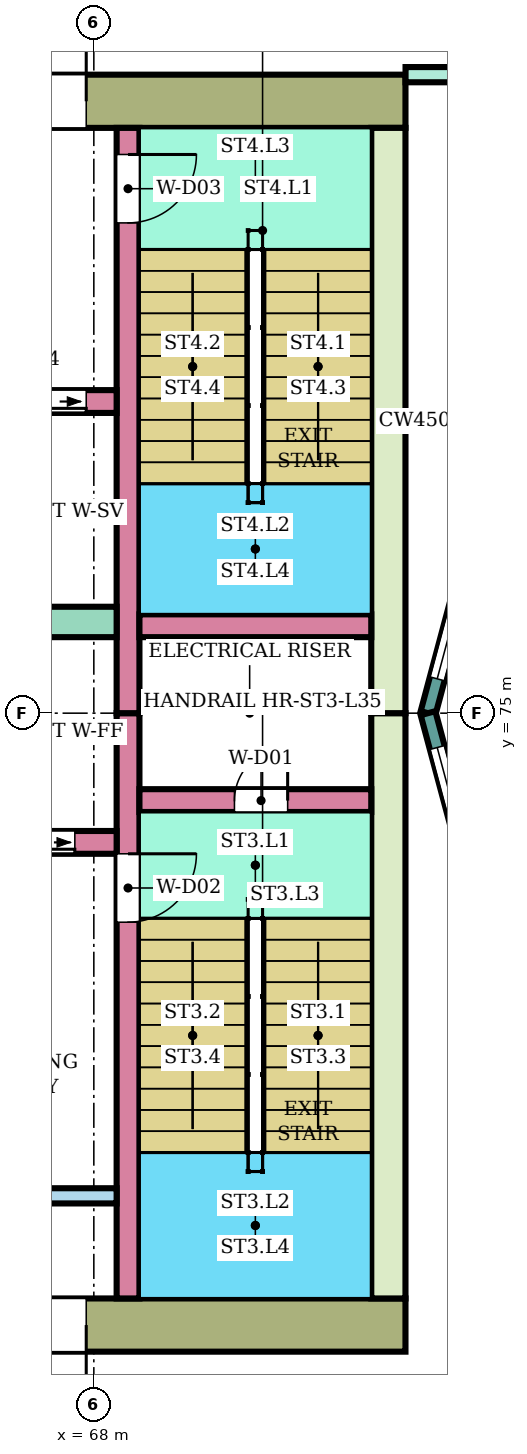
"""IFC4 building model, lengths in metres.
Left out: names, types, materials, properties, quantities, classifications, styles, units other than length and angle.
Written with IfcOpenShell. Run it as: python <this file> out.ifc"""

import sys

from ifc_helpers import new_model, si_unit, direction, frame, frame_2d, origin, place, context, subcontext, project, spatial, rectangle, extrude, element, fill, save


model = new_model("IFC4")
c1 = context("Model", 3, precision=1e-05, world=origin(), true_north=direction((0.0, 1.0)))
c2 = subcontext(c1, "Body", "Model", "MODEL_VIEW")
j1 = project(units=[si_unit("LENGTHUNIT", "METRE"), si_unit("PLANEANGLEUNIT", "RADIAN")], contexts=[c1])
p1 = place(None, origin())
s1 = spatial("IfcSite", under=j1, at=p1, CompositionType="ELEMENT")
p2 = place(p1, origin())
s2 = spatial("IfcBuilding", under=s1, at=p2, CompositionType="ELEMENT")
p3 = place(p2, frame((0.0, 0.0, 149.7)))
s3 = spatial("IfcBuildingStorey", under=s2, at=p3, CompositionType="ELEMENT", Elevation=149.7)
p4 = place(p3, frame((72.1, 66.95, 0.0), z_axis=(0.0, 0.0, 1.0), x_axis=(-1.0, 0.0, 0.0)))
e1 = element("IfcWall", 1, at=p4, inside=s3, PredefinedType="SHEAR", context=c2, shape_type="SweptSolid", body=[
    extrude(rectangle(XDim=14.8, YDim=0.7, at=frame_2d((7.4, 0.0))), origin(), (0.0, 0.0, 1.0), 7.68),
])
p5 = place(p4, frame((4.2, 0.0, 0.0)))
e2 = element("IfcOpeningElement", 2, at=p5, cuts=e1, PredefinedType="OPENING", context=c2, shape_type="SweptSolid", body=[
    extrude(rectangle(XDim=2.4, YDim=2.4, at=frame_2d((1.2, 1.2))), frame((0.0, 0.36, 0.0), z_axis=(0.0, -1.0, 0.0), x_axis=(1.0, 0.0, 0.0)), (0.0, 0.0, 1.0), 0.72),
])
p6 = place(p3, frame((72.1, 83.05, 0.0), z_axis=(0.0, 0.0, 1.0), x_axis=(-1.0, 0.0, 0.0)))
e3 = element("IfcWall", 3, at=p6, inside=s3, PredefinedType="SHEAR", context=c2, shape_type="SweptSolid", body=[
    extrude(rectangle(XDim=14.8, YDim=0.7, at=frame_2d((7.4, 0.0))), origin(), (0.0, 0.0, 1.0), 7.68),
])
p7 = place(p6, frame((4.2, 0.0, 0.0)))
e4 = element("IfcOpeningElement", 4, at=p7, cuts=e3, PredefinedType="OPENING", context=c2, shape_type="SweptSolid", body=[
    extrude(rectangle(XDim=2.4, YDim=2.4, at=frame_2d((1.2, 1.2))), frame((0.0, 0.36, 0.0), z_axis=(0.0, -1.0, 0.0), x_axis=(1.0, 0.0, 0.0)), (0.0, 0.0, 1.0), 0.72),
])
for number, where, z_axis, x_axis in (
    (5, (71.875, 75.0, 0.0), (0.0, 0.0, 1.0), (0.0, -1.0, 0.0)),
    (6, (71.875, 82.7, 0.0), (0.0, 0.0, 1.0), (0.0, -1.0, 0.0)),
):
    element("IfcWall", number, at=place(p3, frame(where, z_axis=z_axis, x_axis=x_axis)), inside=s3, PredefinedType="SHEAR", context=c2, shape_type="SweptSolid", body=[
        extrude(rectangle(XDim=7.7, YDim=0.45, at=frame_2d((3.85, 0.0))), origin(), (0.0, 0.0, 1.0), 7.68),
    ])
p8 = place(p3, frame((68.45, 75.0, 0.0), z_axis=(0.0, 0.0, 1.0), x_axis=(0.0, -1.0, 0.0)))
e7 = element("IfcWall", 7, at=p8, inside=s3, PredefinedType="SHEAR", context=c2, shape_type="SweptSolid", body=[
    extrude(rectangle(XDim=7.7, YDim=0.3, at=frame_2d((3.85, 0.0))), origin(), (0.0, 0.0, 1.0), 7.68),
])
p9 = place(p8, frame((1.85, 0.0, 0.0)))
e8 = element("IfcOpeningElement", 8, at=p9, cuts=e7, PredefinedType="OPENING", context=c2, shape_type="SweptSolid", body=[
    extrude(rectangle(XDim=0.9, YDim=2.1, at=frame_2d((0.45, 1.05))), frame((0.0, 0.16, 0.0), z_axis=(0.0, -1.0, 0.0), x_axis=(1.0, 0.0, 0.0)), (0.0, 0.0, 1.0), 0.32),
])
p10 = place(p3, frame((68.45, 82.7, 0.0), z_axis=(0.0, 0.0, 1.0), x_axis=(0.0, -1.0, 0.0)))
e9 = element("IfcWall", 9, at=p10, inside=s3, PredefinedType="SHEAR", context=c2, shape_type="SweptSolid", body=[
    extrude(rectangle(XDim=7.7, YDim=0.3, at=frame_2d((3.85, 0.0))), origin(), (0.0, 0.0, 1.0), 7.68),
])
p11 = place(p10, frame((0.35, 0.0, 0.0)))
e10 = element("IfcOpeningElement", 10, at=p11, cuts=e9, PredefinedType="OPENING", context=c2, shape_type="SweptSolid", body=[
    extrude(rectangle(XDim=0.9, YDim=2.1, at=frame_2d((0.45, 1.05))), frame((0.0, 0.16, 0.0), z_axis=(0.0, -1.0, 0.0), x_axis=(1.0, 0.0, 0.0)), (0.0, 0.0, 1.0), 0.32),
])
p12 = place(p3, frame((71.65, 73.85, 0.0), z_axis=(0.0, 0.0, 1.0), x_axis=(-1.0, 0.0, 0.0)))
e11 = element("IfcWall", 11, at=p12, inside=s3, PredefinedType="SHEAR", context=c2, shape_type="SweptSolid", body=[
    extrude(rectangle(XDim=3.05, YDim=0.3, at=frame_2d((1.525, 0.0))), origin(), (0.0, 0.0, 1.0), 7.68),
])
p13 = place(p12, frame((1.1, 0.0, 0.0)))
e12 = element("IfcOpeningElement", 12, at=p13, cuts=e11, PredefinedType="OPENING", context=c2, shape_type="SweptSolid", body=[
    extrude(rectangle(XDim=0.7, YDim=2.0, at=frame_2d((0.35, 1.0))), frame((0.0, 0.16, 0.0), z_axis=(0.0, -1.0, 0.0), x_axis=(1.0, 0.0, 0.0)), (0.0, 0.0, 1.0), 0.32),
])
p14 = place(p3, frame((71.65, 76.15, 0.0), z_axis=(0.0, 0.0, 1.0), x_axis=(-1.0, 0.0, 0.0)))
e13 = element("IfcWall", 13, at=p14, inside=s3, PredefinedType="SHEAR", context=c2, shape_type="SweptSolid", body=[
    extrude(rectangle(XDim=3.05, YDim=0.3, at=frame_2d((1.525, 0.0))), origin(), (0.0, 0.0, 1.0), 7.68),
])
p15 = place(p3, frame((68.3, 73.3, 0.0), z_axis=(0.0, 0.0, 1.0), x_axis=(-1.0, 0.0, 0.0)))
e14 = element("IfcWall", 14, at=p15, inside=s3, PredefinedType="SHEAR", context=c2, shape_type="SweptSolid", body=[
    extrude(rectangle(XDim=11.0, YDim=0.3, at=frame_2d((5.5, 0.0))), origin(), (0.0, 0.0, 1.0), 7.68),
])
p16 = place(p15, frame((0.55, 0.0, 0.0)))
e15 = element("IfcOpeningElement", 15, at=p16, cuts=e14, PredefinedType="OPENING", context=c2, shape_type="SweptSolid", body=[
    extrude(rectangle(XDim=1.1, YDim=2.1, at=frame_2d((0.55, 1.05))), frame((0.0, 0.16, 0.0), z_axis=(0.0, -1.0, 0.0), x_axis=(1.0, 0.0, 0.0)), (0.0, 0.0, 1.0), 0.32),
])
p17 = place(p15, frame((3.0, 0.0, 0.0)))
e16 = element("IfcOpeningElement", 16, at=p17, cuts=e14, PredefinedType="OPENING", context=c2, shape_type="SweptSolid", body=[
    extrude(rectangle(XDim=1.2, YDim=2.1, at=frame_2d((0.6, 1.05))), frame((0.0, 0.16, 0.0), z_axis=(0.0, -1.0, 0.0), x_axis=(1.0, 0.0, 0.0)), (0.0, 0.0, 1.0), 0.32),
])
p18 = place(p15, frame((5.5, 0.0, 0.0)))
e17 = element("IfcOpeningElement", 17, at=p18, cuts=e14, PredefinedType="OPENING", context=c2, shape_type="SweptSolid", body=[
    extrude(rectangle(XDim=1.2, YDim=2.1, at=frame_2d((0.6, 1.05))), frame((0.0, 0.16, 0.0), z_axis=(0.0, -1.0, 0.0), x_axis=(1.0, 0.0, 0.0)), (0.0, 0.0, 1.0), 0.32),
])
p19 = place(p15, frame((8.1, 0.0, 0.0)))
e18 = element("IfcOpeningElement", 18, at=p19, cuts=e14, PredefinedType="OPENING", context=c2, shape_type="SweptSolid", body=[
    extrude(rectangle(XDim=1.0, YDim=2.1, at=frame_2d((0.5, 1.05))), frame((0.0, 0.16, 0.0), z_axis=(0.0, -1.0, 0.0), x_axis=(1.0, 0.0, 0.0)), (0.0, 0.0, 1.0), 0.32),
])
p20 = place(p3, frame((68.3, 76.2, 0.0), z_axis=(0.0, 0.0, 1.0), x_axis=(-1.0, 0.0, 0.0)))
e19 = element("IfcWall", 19, at=p20, inside=s3, PredefinedType="SHEAR", context=c2, shape_type="SweptSolid", body=[
    extrude(rectangle(XDim=11.0, YDim=0.4, at=frame_2d((5.5, 0.0))), origin(), (0.0, 0.0, 1.0), 7.68),
])
p21 = place(p3, frame((68.3, 79.1, 0.0), z_axis=(0.0, 0.0, 1.0), x_axis=(-1.0, 0.0, 0.0)))
e20 = element("IfcWall", 20, at=p21, inside=s3, PredefinedType="SHEAR", context=c2, shape_type="SweptSolid", body=[
    extrude(rectangle(XDim=11.0, YDim=0.3, at=frame_2d((5.5, 0.0))), origin(), (0.0, 0.0, 1.0), 7.68),
])
p22 = place(p21, frame((0.4, 0.0, 0.0)))
e21 = element("IfcOpeningElement", 21, at=p22, cuts=e20, PredefinedType="OPENING", context=c2, shape_type="SweptSolid", body=[
    extrude(rectangle(XDim=1.4, YDim=2.1, at=frame_2d((0.7, 1.05))), frame((0.0, 0.16, 0.0), z_axis=(0.0, -1.0, 0.0), x_axis=(1.0, 0.0, 0.0)), (0.0, 0.0, 1.0), 0.32),
])
p23 = place(p21, frame((3.0, 0.0, 0.0)))
e22 = element("IfcOpeningElement", 22, at=p23, cuts=e20, PredefinedType="OPENING", context=c2, shape_type="SweptSolid", body=[
    extrude(rectangle(XDim=1.2, YDim=2.1, at=frame_2d((0.6, 1.05))), frame((0.0, 0.16, 0.0), z_axis=(0.0, -1.0, 0.0), x_axis=(1.0, 0.0, 0.0)), (0.0, 0.0, 1.0), 0.32),
])
p24 = place(p21, frame((5.4, 0.0, 0.0)))
e23 = element("IfcOpeningElement", 23, at=p24, cuts=e20, PredefinedType="OPENING", context=c2, shape_type="SweptSolid", body=[
    extrude(rectangle(XDim=1.4, YDim=2.1, at=frame_2d((0.7, 1.05))), frame((0.0, 0.16, 0.0), z_axis=(0.0, -1.0, 0.0), x_axis=(1.0, 0.0, 0.0)), (0.0, 0.0, 1.0), 0.32),
])
p25 = place(p21, frame((8.1, 0.0, 0.0)))
e24 = element("IfcOpeningElement", 24, at=p25, cuts=e20, PredefinedType="OPENING", context=c2, shape_type="SweptSolid", body=[
    extrude(rectangle(XDim=1.0, YDim=2.1, at=frame_2d((0.5, 1.05))), frame((0.0, 0.16, 0.0), z_axis=(0.0, -1.0, 0.0), x_axis=(1.0, 0.0, 0.0)), (0.0, 0.0, 1.0), 0.32),
])
p26 = place(p3, frame((68.3, 68.65, 0.0), z_axis=(0.0, 0.0, 1.0), x_axis=(-1.0, 0.0, 0.0)))
e25 = element("IfcWall", 25, at=p26, inside=s3, PredefinedType="SHEAR", context=c2, shape_type="SweptSolid", body=[
    extrude(rectangle(XDim=4.5, YDim=0.2, at=frame_2d((2.25, 0.0))), origin(), (0.0, 0.0, 1.0), 7.68),
])
p27 = place(p3, frame((73.415, 78.802, 0.0), z_axis=(0.0, 0.0, 1.0), x_axis=(-0.258789828301, -0.965933654434, 0.0)))
e26 = element("IfcWall", 26, at=p27, inside=s3, PredefinedType="NOTDEFINED", context=c2, shape_type="SweptSolid", body=[
    extrude(rectangle(XDim=3.936, YDim=0.2, at=frame_2d((1.968, 0.0))), origin(), (0.0, 0.0, 1.0), 8.0),
])
p28 = place(p27, frame((0.468, 0.0, 0.9)))
e27 = element("IfcOpeningElement", 27, at=p28, cuts=e26, PredefinedType="OPENING", context=c2, shape_type="SweptSolid", body=[
    extrude(rectangle(XDim=3.0, YDim=2.3, at=frame_2d((1.5, 1.15))), frame((0.0, 0.11, 0.0), z_axis=(0.0, -1.0, 0.0), x_axis=(1.0, 0.0, 0.0)), (0.0, 0.0, 1.0), 0.22),
])
p29 = place(p3, frame((72.396, 75.0, 0.0), z_axis=(0.0, 0.0, 1.0), x_axis=(0.258789828301, -0.965933654434, 0.0)))
e28 = element("IfcWall", 28, at=p29, inside=s3, PredefinedType="NOTDEFINED", context=c2, shape_type="SweptSolid", body=[
    extrude(rectangle(XDim=3.936, YDim=0.2, at=frame_2d((1.968, 0.0))), origin(), (0.0, 0.0, 1.0), 8.0),
])
p30 = place(p29, frame((0.468, 0.0, 0.9)))
e29 = element("IfcOpeningElement", 29, at=p30, cuts=e28, PredefinedType="OPENING", context=c2, shape_type="SweptSolid", body=[
    extrude(rectangle(XDim=3.0, YDim=2.3, at=frame_2d((1.5, 1.15))), frame((0.0, 0.11, 0.0), z_axis=(0.0, -1.0, 0.0), x_axis=(1.0, 0.0, 0.0)), (0.0, 0.0, 1.0), 0.22),
])
p31 = place(p3, frame((75.5, 82.794, 0.0), z_axis=(0.0, 0.0, 1.0), x_axis=(-0.499999880539, 0.866025472755, 0.0)))
e30 = element("IfcWall", 30, at=p31, inside=s3, PredefinedType="NOTDEFINED", context=c2, shape_type="SweptSolid", body=[
    extrude(rectangle(XDim=8.1, YDim=0.2, at=frame_2d((4.05, 0.0))), origin(), (0.0, 0.0, 1.0), 8.0),
])
p32 = place(p31, frame((1.0, 0.0, 0.3)))
e31 = element("IfcOpeningElement", 31, at=p32, cuts=e30, PredefinedType="OPENING", context=c2, shape_type="SweptSolid", body=[
    extrude(rectangle(XDim=2.4, YDim=3.6, at=frame_2d((1.2, 1.8))), frame((0.0, 0.11, 0.0), z_axis=(0.0, -1.0, 0.0), x_axis=(1.0, 0.0, 0.0)), (0.0, 0.0, 1.0), 0.22),
])
p33 = place(p31, frame((3.85, 0.0, 0.0)))
e32 = element("IfcOpeningElement", 32, at=p33, cuts=e30, PredefinedType="OPENING", context=c2, shape_type="SweptSolid", body=[
    extrude(rectangle(XDim=1.8, YDim=2.4, at=frame_2d((0.9, 1.2))), frame((0.0, 0.11, 0.0), z_axis=(0.0, -1.0, 0.0), x_axis=(1.0, 0.0, 0.0)), (0.0, 0.0, 1.0), 0.22),
])
p34 = place(p31, frame((6.1, 0.0, 0.3)))
e33 = element("IfcOpeningElement", 33, at=p34, cuts=e30, PredefinedType="OPENING", context=c2, shape_type="SweptSolid", body=[
    extrude(rectangle(XDim=1.6, YDim=3.6, at=frame_2d((0.8, 1.8))), frame((0.0, 0.11, 0.0), z_axis=(0.0, -1.0, 0.0), x_axis=(1.0, 0.0, 0.0)), (0.0, 0.0, 1.0), 0.22),
])
p35 = place(p3, frame((75.5, 67.206, 0.0), z_axis=(0.0, 0.0, 1.0), x_axis=(-0.499999880539, -0.866025472755, 0.0)))
e34 = element("IfcWall", 34, at=p35, inside=s3, PredefinedType="NOTDEFINED", context=c2, shape_type="SweptSolid", body=[
    extrude(rectangle(XDim=8.1, YDim=0.2, at=frame_2d((4.05, 0.0))), origin(), (0.0, 0.0, 1.0), 8.0),
])
p36 = place(p35, frame((1.0, 0.0, 0.3)))
e35 = element("IfcOpeningElement", 35, at=p36, cuts=e34, PredefinedType="OPENING", context=c2, shape_type="SweptSolid", body=[
    extrude(rectangle(XDim=2.4, YDim=3.6, at=frame_2d((1.2, 1.8))), frame((0.0, 0.11, 0.0), z_axis=(0.0, -1.0, 0.0), x_axis=(1.0, 0.0, 0.0)), (0.0, 0.0, 1.0), 0.22),
])
p37 = place(p35, frame((3.85, 0.0, 0.0)))
e36 = element("IfcOpeningElement", 36, at=p37, cuts=e34, PredefinedType="OPENING", context=c2, shape_type="SweptSolid", body=[
    extrude(rectangle(XDim=1.8, YDim=2.4, at=frame_2d((0.9, 1.2))), frame((0.0, 0.11, 0.0), z_axis=(0.0, -1.0, 0.0), x_axis=(1.0, 0.0, 0.0)), (0.0, 0.0, 1.0), 0.22),
])
p38 = place(p35, frame((6.1, 0.0, 0.3)))
e37 = element("IfcOpeningElement", 37, at=p38, cuts=e34, PredefinedType="OPENING", context=c2, shape_type="SweptSolid", body=[
    extrude(rectangle(XDim=1.6, YDim=3.6, at=frame_2d((0.8, 1.8))), frame((0.0, 0.11, 0.0), z_axis=(0.0, -1.0, 0.0), x_axis=(1.0, 0.0, 0.0)), (0.0, 0.0, 1.0), 0.22),
])
p39 = place(p3, frame((72.101, 83.4, 0.0), z_axis=(0.0, 0.0, 1.0), x_axis=(1.0, 0.0, 0.0)))
e38 = element("IfcWall", 38, at=p39, inside=s3, PredefinedType="PARTITIONING", context=c2, shape_type="SweptSolid", body=[
    extrude(rectangle(XDim=3.048, YDim=0.2, at=frame_2d((1.524, 0.0))), origin(), (0.0, 0.0, 1.0), 7.55),
])
p40 = place(p28, origin())
e39 = element("IfcWindow", 39, at=p40, inside=s3, PartitioningType="SINGLE_PANEL", PredefinedType="WINDOW", context=c2, shape_type="SweptSolid", body=[
    extrude(rectangle(XDim=3.0, YDim=2.3, at=frame_2d((1.5, 1.15))), frame((0.0, 0.03, 0.0), z_axis=(0.0, -1.0, 0.0), x_axis=(1.0, 0.0, 0.0)), (0.0, 0.0, 1.0), 0.06),
])
fill(e27, e39)
p41 = place(p30, origin())
e40 = element("IfcWindow", 40, at=p41, inside=s3, PartitioningType="SINGLE_PANEL", PredefinedType="WINDOW", context=c2, shape_type="SweptSolid", body=[
    extrude(rectangle(XDim=3.0, YDim=2.3, at=frame_2d((1.5, 1.15))), frame((0.0, 0.03, 0.0), z_axis=(0.0, -1.0, 0.0), x_axis=(1.0, 0.0, 0.0)), (0.0, 0.0, 1.0), 0.06),
])
fill(e29, e40)
p42 = place(p13, frame((0.7, 0.0, 0.0), z_axis=(0.0, 0.0, 1.0), x_axis=(-1.0, 0.0, 0.0)))
e41 = element("IfcDoor", 41, at=p42, inside=s3, OperationType="SINGLE_SWING_RIGHT", PredefinedType="DOOR", context=c2, shape_type="SweptSolid", body=[
    extrude(rectangle(XDim=0.7, YDim=2.0, at=frame_2d((0.35, 1.0))), frame((0.0, 0.025, 0.0), z_axis=(0.0, -1.0, 0.0), x_axis=(1.0, 0.0, 0.0)), (0.0, 0.0, 1.0), 0.05),
])
fill(e12, e41)
p43 = place(p9, origin())
e42 = element("IfcDoor", 42, at=p43, inside=s3, OperationType="SINGLE_SWING_LEFT", PredefinedType="DOOR", context=c2, shape_type="SweptSolid", body=[
    extrude(rectangle(XDim=0.9, YDim=2.1, at=frame_2d((0.45, 1.05))), frame((0.0, 0.025, 0.0), z_axis=(0.0, -1.0, 0.0), x_axis=(1.0, 0.0, 0.0)), (0.0, 0.0, 1.0), 0.05),
])
fill(e8, e42)
p44 = place(p11, origin())
e43 = element("IfcDoor", 43, at=p44, inside=s3, OperationType="SINGLE_SWING_LEFT", PredefinedType="DOOR", context=c2, shape_type="SweptSolid", body=[
    extrude(rectangle(XDim=0.9, YDim=2.1, at=frame_2d((0.45, 1.05))), frame((0.0, 0.025, 0.0), z_axis=(0.0, -1.0, 0.0), x_axis=(1.0, 0.0, 0.0)), (0.0, 0.0, 1.0), 0.05),
])
fill(e10, e43)
p45 = place(p16, origin())
e44 = element("IfcDoor", 44, at=p45, inside=s3, OperationType="DOUBLE_DOOR_SLIDING", PredefinedType="DOOR", context=c2, shape_type="SweptSolid", body=[
    extrude(rectangle(XDim=1.1, YDim=2.1, at=frame_2d((0.55, 1.05))), frame((0.0, 0.025, 0.0), z_axis=(0.0, -1.0, 0.0), x_axis=(1.0, 0.0, 0.0)), (0.0, 0.0, 1.0), 0.05),
])
fill(e15, e44)
p46 = place(p22, origin())
e45 = element("IfcDoor", 45, at=p46, inside=s3, OperationType="DOUBLE_DOOR_SLIDING", PredefinedType="DOOR", context=c2, shape_type="SweptSolid", body=[
    extrude(rectangle(XDim=1.4, YDim=2.1, at=frame_2d((0.7, 1.05))), frame((0.0, 0.025, 0.0), z_axis=(0.0, -1.0, 0.0), x_axis=(1.0, 0.0, 0.0)), (0.0, 0.0, 1.0), 0.05),
])
fill(e21, e45)
p47 = place(p5, origin())
e46 = element("IfcDoor", 46, at=p47, inside=s3, OperationType="DOUBLE_DOOR_SINGLE_SWING", PredefinedType="DOOR", context=c2, shape_type="SweptSolid", body=[
    extrude(rectangle(XDim=2.4, YDim=2.4, at=frame_2d((1.2, 1.2))), frame((0.0, 0.025, 0.0), z_axis=(0.0, -1.0, 0.0), x_axis=(1.0, 0.0, 0.0)), (0.0, 0.0, 1.0), 0.05),
])
fill(e2, e46)
p48 = place(p7, frame((2.4, 0.0, 0.0), z_axis=(0.0, 0.0, 1.0), x_axis=(-1.0, 0.0, 0.0)))
e47 = element("IfcDoor", 47, at=p48, inside=s3, OperationType="DOUBLE_DOOR_SINGLE_SWING", PredefinedType="DOOR", context=c2, shape_type="SweptSolid", body=[
    extrude(rectangle(XDim=2.4, YDim=2.4, at=frame_2d((1.2, 1.2))), frame((0.0, 0.025, 0.0), z_axis=(0.0, -1.0, 0.0), x_axis=(1.0, 0.0, 0.0)), (0.0, 0.0, 1.0), 0.05),
])
fill(e4, e47)
save(model, sys.argv[1])
